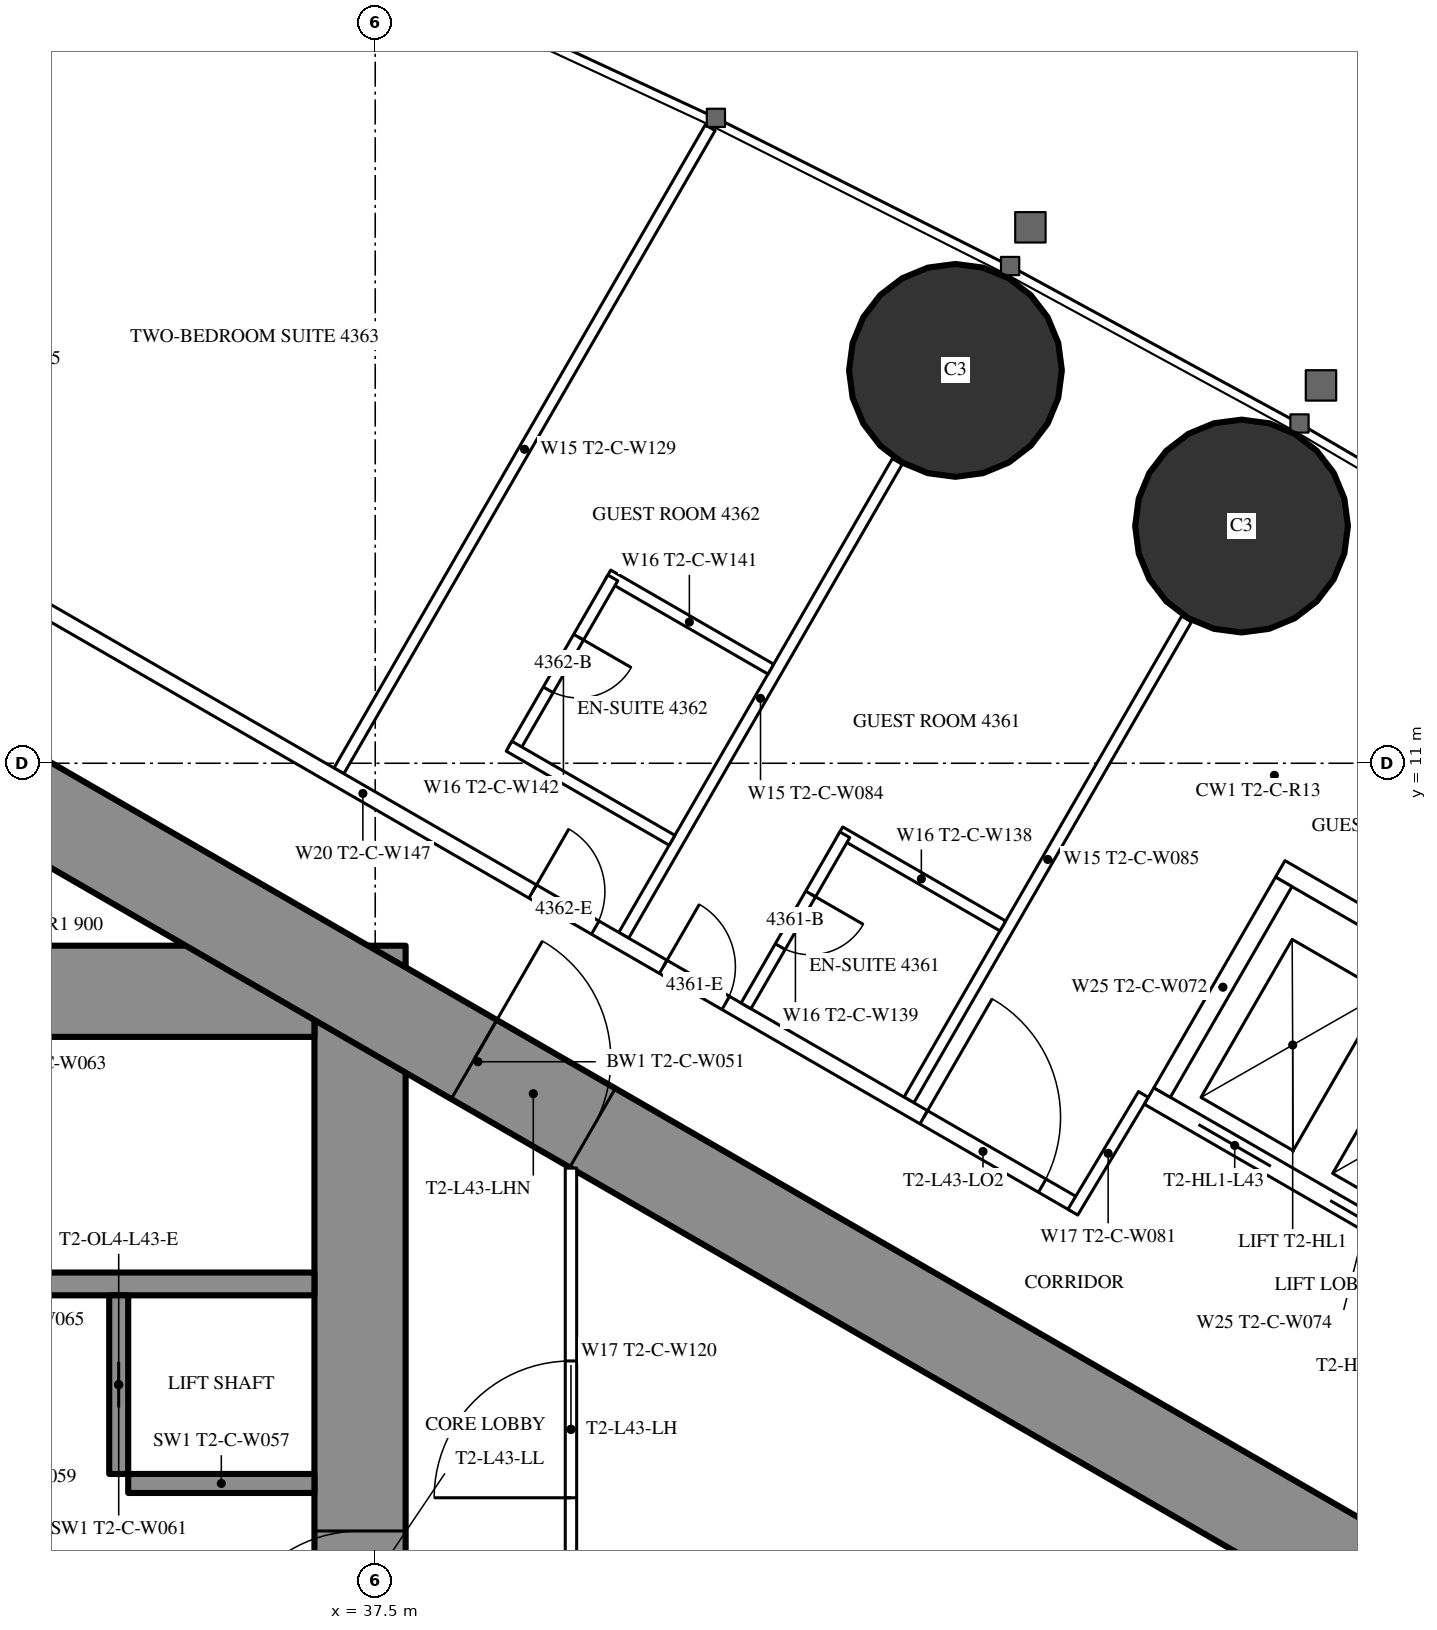
"""IFC4 building model, lengths in metres.
Left out: names, types, materials, properties, quantities, classifications, styles, units other than length and angle.
Written with IfcOpenShell. Run it as: python <this file> out.ifc"""

import sys

from ifc_helpers import new_model, si_unit, direction, frame, frame_2d, origin, origin_2d, place, context, subcontext, project, spatial, rectangle, circle, extrude, element, fill, save


model = new_model("IFC4")
c1 = context("Model", 3, precision=1e-05, world=origin(), true_north=direction((0.0, 1.0)))
c2 = subcontext(c1, "Body", "Model", "MODEL_VIEW")
j1 = project(units=[si_unit("LENGTHUNIT", "METRE"), si_unit("PLANEANGLEUNIT", "RADIAN")], contexts=[c1])
p1 = place(None, origin())
s1 = spatial("IfcSite", under=j1, at=p1, CompositionType="ELEMENT")
p2 = place(p1, origin())
s2 = spatial("IfcBuilding", under=s1, at=p2, CompositionType="ELEMENT")
p3 = place(p2, frame((0.0, 0.0, 163.3)))
s3 = spatial("IfcBuildingStorey", under=s2, at=p3, CompositionType="ELEMENT", Elevation=163.3)
for number, where, z_axis, x_axis in (
    (1, (48.897, 14.121, 0.0), (0.0, 0.0, 1.0), (1.0, 0.0, 0.0)),
    (2, (45.134, 16.168, 0.0), (0.0, 0.0, 1.0), (1.0, 0.0, 0.0)),
):
    element("IfcColumn", number, at=place(p3, frame(where, z_axis=z_axis, x_axis=x_axis)), inside=s3, PredefinedType="COLUMN", context=c2, shape_type="SweptSolid", body=[
        extrude(circle(Radius=1.4, at=origin_2d()), origin(), (0.0, 0.0, 1.0), 3.5),
    ])
p4 = place(p3, frame((37.3, -8.6, 0.0), z_axis=(0.0, 0.0, 1.0), x_axis=(0.0, 1.0, 0.0)))
e3 = element("IfcWall", 3, at=p4, inside=s3, PredefinedType="SHEAR", context=c2, shape_type="SweptSolid", body=[
    extrude(rectangle(XDim=17.2, YDim=1.2, at=frame_2d((8.6, 0.0))), origin(), (0.0, 0.0, 1.0), 3.5),
])
p5 = place(p4, frame((7.7, 0.0, 0.0)))
e4 = element("IfcOpeningElement", 4, at=p5, cuts=e3, PredefinedType="OPENING", context=c2, shape_type="SweptSolid", body=[
    extrude(rectangle(XDim=1.8, YDim=2.2, at=frame_2d((0.9, 1.1))), frame((0.0, 0.61, 0.0), z_axis=(0.0, -1.0, 0.0), x_axis=(1.0, 0.0, 0.0)), (0.0, 0.0, 1.0), 1.22),
])
p6 = place(p3, frame((28.3, 8.0, 0.0), z_axis=(0.0, 0.0, 1.0), x_axis=(1.0, 0.0, 0.0)))
e5 = element("IfcWall", 5, at=p6, inside=s3, PredefinedType="SHEAR", context=c2, shape_type="SweptSolid", body=[
    extrude(rectangle(XDim=8.4, YDim=1.2, at=frame_2d((4.2, 0.0))), origin(), (0.0, 0.0, 1.0), 3.5),
])
p7 = place(p6, frame((0.25, 0.0, 0.0)))
e6 = element("IfcOpeningElement", 6, at=p7, cuts=e5, PredefinedType="OPENING", context=c2, shape_type="SweptSolid", body=[
    extrude(rectangle(XDim=1.0, YDim=2.2, at=frame_2d((0.5, 1.1))), frame((0.0, 0.61, 0.0), z_axis=(0.0, -1.0, 0.0), x_axis=(1.0, 0.0, 0.0)), (0.0, 0.0, 1.0), 1.22),
])
p8 = place(p3, frame((28.3, 4.15, 0.0), z_axis=(0.0, 0.0, 1.0), x_axis=(1.0, 0.0, 0.0)))
e7 = element("IfcWall", 7, at=p8, inside=s3, PredefinedType="SHEAR", context=c2, shape_type="SweptSolid", body=[
    extrude(rectangle(XDim=8.4, YDim=0.3, at=frame_2d((4.2, 0.0))), origin(), (0.0, 0.0, 1.0), 3.5),
])
p9 = place(p3, frame((34.125, 1.65, 0.0), z_axis=(0.0, 0.0, 1.0), x_axis=(0.0, 1.0, 0.0)))
e8 = element("IfcWall", 8, at=p9, inside=s3, PredefinedType="SHEAR", context=c2, shape_type="SweptSolid", body=[
    extrude(rectangle(XDim=2.35, YDim=0.25, at=frame_2d((1.175, 0.0))), origin(), (0.0, 0.0, 1.0), 3.5),
])
p10 = place(p9, frame((0.875, 0.0, 0.0)))
e9 = element("IfcOpeningElement", 9, at=p10, cuts=e8, PredefinedType="OPENING", context=c2, shape_type="SweptSolid", body=[
    extrude(rectangle(XDim=0.6, YDim=2.0, at=frame_2d((0.3, 1.0))), frame((0.0, 0.135, 0.0), z_axis=(0.0, -1.0, 0.0), x_axis=(1.0, 0.0, 0.0)), (0.0, 0.0, 1.0), 0.27),
])
p11 = place(p3, frame((34.25, 1.525, 0.0), z_axis=(0.0, 0.0, 1.0), x_axis=(1.0, 0.0, 0.0)))
e10 = element("IfcWall", 10, at=p11, inside=s3, PredefinedType="SHEAR", context=c2, shape_type="SweptSolid", body=[
    extrude(rectangle(XDim=2.45, YDim=0.25, at=frame_2d((1.225, 0.0))), origin(), (0.0, 0.0, 1.0), 3.5),
])
p12 = place(p3, frame((27.2, -13.8, 0.0), z_axis=(0.0, 0.0, 1.0), x_axis=(0.866027159892, 0.499996958321, 0.0)))
e11 = element("IfcWall", 11, at=p12, inside=s3, PredefinedType="SHEAR", context=c2, shape_type="SweptSolid", body=[
    extrude(rectangle(XDim=27.947, YDim=1.2, at=frame_2d((13.973, 0.0))), origin(), (0.0, 0.0, 1.0), 3.5),
])
p13 = place(p12, frame((4.6, 0.0, 0.0)))
e12 = element("IfcOpeningElement", 12, at=p13, cuts=e11, PredefinedType="OPENING", context=c2, shape_type="SweptSolid", body=[
    extrude(rectangle(XDim=1.0, YDim=2.2, at=frame_2d((0.5, 1.1))), frame((0.0, 0.61, 0.0), z_axis=(0.0, -1.0, 0.0), x_axis=(1.0, 0.0, 0.0)), (0.0, 0.0, 1.0), 1.22),
])
p14 = place(p12, frame((13.395, 0.0, 0.0)))
e13 = element("IfcOpeningElement", 13, at=p14, cuts=e11, PredefinedType="OPENING", context=c2, shape_type="SweptSolid", body=[
    extrude(rectangle(XDim=1.8, YDim=2.2, at=frame_2d((0.9, 1.1))), frame((0.0, 0.61, 0.0), z_axis=(0.0, -1.0, 0.0), x_axis=(1.0, 0.0, 0.0)), (0.0, 0.0, 1.0), 1.22),
])
p15 = place(p3, frame((27.2, 13.8, 0.0), z_axis=(0.0, 0.0, 1.0), x_axis=(0.866024515034, -0.500001539357, 0.0)))
e14 = element("IfcWall", 14, at=p15, inside=s3, PredefinedType="SHEAR", context=c2, shape_type="SweptSolid", body=[
    extrude(rectangle(XDim=26.907, YDim=1.2, at=frame_2d((13.454, 0.0))), origin(), (0.0, 0.0, 1.0), 3.5),
])
p16 = place(p15, frame((4.6, 0.0, 0.0)))
e15 = element("IfcOpeningElement", 15, at=p16, cuts=e14, PredefinedType="OPENING", context=c2, shape_type="SweptSolid", body=[
    extrude(rectangle(XDim=1.0, YDim=2.2, at=frame_2d((0.5, 1.1))), frame((0.0, 0.61, 0.0), z_axis=(0.0, -1.0, 0.0), x_axis=(1.0, 0.0, 0.0)), (0.0, 0.0, 1.0), 1.22),
])
p17 = place(p15, frame((13.395, 0.0, 0.0)))
e16 = element("IfcOpeningElement", 16, at=p17, cuts=e14, PredefinedType="OPENING", context=c2, shape_type="SweptSolid", body=[
    extrude(rectangle(XDim=1.8, YDim=2.2, at=frame_2d((0.9, 1.1))), frame((0.0, 0.61, 0.0), z_axis=(0.0, -1.0, 0.0), x_axis=(1.0, 0.0, 0.0)), (0.0, 0.0, 1.0), 1.22),
])
p18 = place(p3, frame((37.022, 10.9, 0.0), z_axis=(0.0, 0.0, 1.0), x_axis=(0.499998620953, 0.866026199976, 0.0)))
e17 = element("IfcWall", 17, at=p18, inside=s3, PredefinedType="PARTITIONING", context=c2, shape_type="SweptSolid", body=[
    extrude(rectangle(XDim=9.77, YDim=0.15, at=frame_2d((4.885, 0.0))), origin(), (0.0, 0.0, 1.0), 3.25),
])
p19 = place(p3, frame((40.769, 8.737, 0.0), z_axis=(0.0, 0.0, 1.0), x_axis=(0.500013115284, 0.866017831539, 0.0)))
e18 = element("IfcWall", 18, at=p19, inside=s3, PredefinedType="PARTITIONING", context=c2, shape_type="SweptSolid", body=[
    extrude(rectangle(XDim=7.198, YDim=0.15, at=frame_2d((3.599, 0.0))), origin(), (0.0, 0.0, 1.0), 2.3),
])
p20 = place(p3, frame((44.521, 6.571, 0.0), z_axis=(0.0, 0.0, 1.0), x_axis=(0.500020376429, 0.866013639128, 0.0)))
e19 = element("IfcWall", 19, at=p20, inside=s3, PredefinedType="PARTITIONING", context=c2, shape_type="SweptSolid", body=[
    extrude(rectangle(XDim=7.306, YDim=0.15, at=frame_2d((3.653, 0.0))), origin(), (0.0, 0.0, 1.0), 2.3),
])
p21 = place(p3, frame((27.959, 16.017, 0.0), z_axis=(0.0, 0.0, 1.0), x_axis=(0.866027146794, -0.499996981007, 0.0)))
e20 = element("IfcWall", 20, at=p21, inside=s3, PredefinedType="PARTITIONING", context=c2, shape_type="SweptSolid", body=[
    extrude(rectangle(XDim=21.657, YDim=0.2, at=frame_2d((10.829, 0.0))), origin(), (0.0, 0.0, 1.0), 3.25),
])
p22 = place(p21, frame((15.391, 0.0, 0.0)))
e21 = element("IfcOpeningElement", 21, at=p22, cuts=e20, PredefinedType="OPENING", context=c2, shape_type="SweptSolid", body=[
    extrude(rectangle(XDim=0.95, YDim=2.2, at=frame_2d((0.475, 1.1))), frame((0.0, 0.11, 0.0), z_axis=(0.0, -1.0, 0.0), x_axis=(1.0, 0.0, 0.0)), (0.0, 0.0, 1.0), 0.22),
])
p23 = place(p21, frame((13.409, 0.0, 0.0)))
e22 = element("IfcOpeningElement", 22, at=p23, cuts=e20, PredefinedType="OPENING", context=c2, shape_type="SweptSolid", body=[
    extrude(rectangle(XDim=0.95, YDim=2.2, at=frame_2d((0.475, 1.1))), frame((0.0, 0.11, 0.0), z_axis=(0.0, -1.0, 0.0), x_axis=(1.0, 0.0, 0.0)), (0.0, 0.0, 1.0), 0.22),
])
p24 = place(p21, frame((0.6, 0.0, 0.0)))
e23 = element("IfcOpeningElement", 23, at=p24, cuts=e20, PredefinedType="OPENING", context=c2, shape_type="SweptSolid", body=[
    extrude(rectangle(XDim=0.95, YDim=2.2, at=frame_2d((0.475, 1.1))), frame((0.0, 0.11, 0.0), z_axis=(0.0, -1.0, 0.0), x_axis=(1.0, 0.0, 0.0)), (0.0, 0.0, 1.0), 0.22),
])
p25 = place(p21, frame((19.349, 0.0, 0.0)))
e24 = element("IfcOpeningElement", 24, at=p25, cuts=e20, PredefinedType="OPENING", context=c2, shape_type="SweptSolid", body=[
    extrude(rectangle(XDim=1.8, YDim=2.2, at=frame_2d((0.9, 1.1))), frame((0.0, 0.11, 0.0), z_axis=(0.0, -1.0, 0.0), x_axis=(1.0, 0.0, 0.0)), (0.0, 0.0, 1.0), 0.22),
])
p26 = place(p3, frame((47.606, 6.643, 0.0), z_axis=(0.0, 0.0, 1.0), x_axis=(-0.514237157483, -0.857648031458, 0.0)))
e25 = element("IfcWall", 25, at=p26, inside=s3, PredefinedType="PARTITIONING", context=c2, shape_type="SweptSolid", body=[
    extrude(rectangle(XDim=1.805, YDim=0.15, at=frame_2d((0.902, 0.0))), origin(), (0.0, 0.0, 1.0), 3.25),
])
p27 = place(p3, frame((43.613, 10.097, 0.0), z_axis=(0.0, 0.0, 1.0), x_axis=(0.866031185235, -0.4999899861, 0.0)))
e26 = element("IfcWall", 26, at=p27, inside=s3, PredefinedType="PARTITIONING", context=c2, shape_type="SweptSolid", body=[
    extrude(rectangle(XDim=2.475, YDim=0.15, at=frame_2d((1.238, 0.0))), origin(), (0.0, 0.0, 1.0), 3.25),
])
p28 = place(p3, frame((42.378, 7.808, 0.0), z_axis=(0.0, 0.0, 1.0), x_axis=(0.500006934395, 0.866021400173, 0.0)))
e27 = element("IfcWall", 27, at=p28, inside=s3, PredefinedType="PARTITIONING", context=c2, shape_type="SweptSolid", body=[
    extrude(rectangle(XDim=2.6, YDim=0.15, at=frame_2d((1.3, 0.0))), origin(), (0.0, 0.0, 1.0), 3.25),
])
p29 = place(p28, frame((0.9, 0.0, 0.0)))
e28 = element("IfcOpeningElement", 28, at=p29, cuts=e27, PredefinedType="OPENING", context=c2, shape_type="SweptSolid", body=[
    extrude(rectangle(XDim=0.8, YDim=2.2, at=frame_2d((0.4, 1.1))), frame((0.0, 0.085, 0.0), z_axis=(0.0, -1.0, 0.0), x_axis=(1.0, 0.0, 0.0)), (0.0, 0.0, 1.0), 0.17),
])
p30 = place(p3, frame((40.561, 13.476, 0.0), z_axis=(0.0, 0.0, 1.0), x_axis=(0.866006523861, -0.500032699561, 0.0)))
e29 = element("IfcWall", 29, at=p30, inside=s3, PredefinedType="PARTITIONING", context=c2, shape_type="SweptSolid", body=[
    extrude(rectangle(XDim=2.475, YDim=0.15, at=frame_2d((1.237, 0.0))), origin(), (0.0, 0.0, 1.0), 3.25),
])
p31 = place(p3, frame((39.326, 11.187, 0.0), z_axis=(0.0, 0.0, 1.0), x_axis=(0.500047596559, 0.865997922154, 0.0)))
e30 = element("IfcWall", 30, at=p31, inside=s3, PredefinedType="PARTITIONING", context=c2, shape_type="SweptSolid", body=[
    extrude(rectangle(XDim=2.6, YDim=0.15, at=frame_2d((1.3, 0.0))), origin(), (0.0, 0.0, 1.0), 3.25),
])
p32 = place(p31, frame((0.9, 0.0, 0.0)))
e31 = element("IfcOpeningElement", 31, at=p32, cuts=e30, PredefinedType="OPENING", context=c2, shape_type="SweptSolid", body=[
    extrude(rectangle(XDim=0.8, YDim=2.2, at=frame_2d((0.4, 1.1))), frame((0.0, 0.085, 0.0), z_axis=(0.0, -1.0, 0.0), x_axis=(1.0, 0.0, 0.0)), (0.0, 0.0, 1.0), 0.17),
])
p33 = place(p3, frame((39.261, 11.224, 0.0), z_axis=(0.0, 0.0, 1.0), x_axis=(0.866006523861, -0.500032699561, 0.0)))
e32 = element("IfcWall", 32, at=p33, inside=s3, PredefinedType="PARTITIONING", context=c2, shape_type="SweptSolid", body=[
    extrude(rectangle(XDim=2.475, YDim=0.15, at=frame_2d((1.237, 0.0))), origin(), (0.0, 0.0, 1.0), 3.25),
])
p34 = place(p3, frame((40.075, -1.2, 0.0), z_axis=(0.0, 0.0, 1.0), x_axis=(0.0, 1.0, 0.0)))
e33 = element("IfcWall", 33, at=p34, inside=s3, PredefinedType="PARTITIONING", context=c2, shape_type="SweptSolid", body=[
    extrude(rectangle(XDim=6.874, YDim=0.15, at=frame_2d((3.437, 0.0))), origin(), (0.0, 0.0, 1.0), 3.25),
])
p35 = place(p34, frame((2.537, 0.0, 0.0)))
e34 = element("IfcOpeningElement", 34, at=p35, cuts=e33, PredefinedType="OPENING", context=c2, shape_type="SweptSolid", body=[
    extrude(rectangle(XDim=1.8, YDim=2.2, at=frame_2d((0.9, 1.1))), frame((0.0, 0.085, 0.0), z_axis=(0.0, -1.0, 0.0), x_axis=(1.0, 0.0, 0.0)), (0.0, 0.0, 1.0), 0.17),
])
p36 = place(p3, frame((47.681, 6.622, 0.0), z_axis=(0.0, 0.0, 1.0), x_axis=(0.86603344179, -0.499986077507, 0.0)))
e35 = element("IfcWall", 35, at=p36, inside=s3, PredefinedType="PARTITIONING", context=c2, shape_type="SweptSolid", body=[
    extrude(rectangle(XDim=6.6, YDim=0.25, at=frame_2d((3.3, 0.0))), origin(), (0.0, 0.0, 1.0), 3.25),
])
p37 = place(p36, frame((0.75, 0.0, 0.0)))
e36 = element("IfcOpeningElement", 36, at=p37, cuts=e35, PredefinedType="OPENING", context=c2, shape_type="SweptSolid", body=[
    extrude(rectangle(XDim=1.1, YDim=2.2, at=frame_2d((0.55, 1.1))), frame((0.0, 0.135, 0.0), z_axis=(0.0, -1.0, 0.0), x_axis=(1.0, 0.0, 0.0)), (0.0, 0.0, 1.0), 0.27),
])
p38 = place(p36, frame((2.75, 0.0, 0.0)))
e37 = element("IfcOpeningElement", 37, at=p38, cuts=e35, PredefinedType="OPENING", context=c2, shape_type="SweptSolid", body=[
    extrude(rectangle(XDim=1.1, YDim=2.2, at=frame_2d((0.55, 1.1))), frame((0.0, 0.135, 0.0), z_axis=(0.0, -1.0, 0.0), x_axis=(1.0, 0.0, 0.0)), (0.0, 0.0, 1.0), 0.27),
])
p39 = place(p36, frame((4.75, 0.0, 0.0)))
e38 = element("IfcOpeningElement", 38, at=p39, cuts=e35, PredefinedType="OPENING", context=c2, shape_type="SweptSolid", body=[
    extrude(rectangle(XDim=1.1, YDim=2.2, at=frame_2d((0.55, 1.1))), frame((0.0, 0.135, 0.0), z_axis=(0.0, -1.0, 0.0), x_axis=(1.0, 0.0, 0.0)), (0.0, 0.0, 1.0), 0.27),
])
p40 = place(p3, frame((49.406, 9.611, 0.0), z_axis=(0.0, 0.0, 1.0), x_axis=(0.86603344179, -0.499986077507, 0.0)))
e39 = element("IfcWall", 39, at=p40, inside=s3, PredefinedType="PARTITIONING", context=c2, shape_type="SweptSolid", body=[
    extrude(rectangle(XDim=6.6, YDim=0.25, at=frame_2d((3.3, 0.0))), origin(), (0.0, 0.0, 1.0), 3.25),
])
p41 = place(p3, frame((47.852, 6.668, 0.0), z_axis=(0.0, 0.0, 1.0), x_axis=(0.499929347863, 0.866066190972, 0.0)))
e40 = element("IfcWall", 40, at=p41, inside=s3, PredefinedType="PARTITIONING", context=c2, shape_type="SweptSolid", body=[
    extrude(rectangle(XDim=3.201, YDim=0.25, at=frame_2d((1.6, 0.0))), origin(), (0.0, 0.0, 1.0), 3.25),
])
p42 = place(p29, origin())
e41 = element("IfcDoor", 41, at=p42, inside=s3, OperationType="SINGLE_SWING_RIGHT", PredefinedType="DOOR", context=c2, shape_type="SweptSolid", body=[
    extrude(rectangle(XDim=0.8, YDim=2.2, at=frame_2d((0.4, 1.1))), frame((0.0, 0.025, 0.0), z_axis=(0.0, -1.0, 0.0), x_axis=(1.0, 0.0, 0.0)), (0.0, 0.0, 1.0), 0.05),
])
fill(e28, e41)
p43 = place(p22, origin())
e42 = element("IfcDoor", 42, at=p43, inside=s3, OperationType="SINGLE_SWING_LEFT", PredefinedType="DOOR", context=c2, shape_type="SweptSolid", body=[
    extrude(rectangle(XDim=0.95, YDim=2.2, at=frame_2d((0.475, 1.1))), frame((0.0, 0.025, 0.0), z_axis=(0.0, -1.0, 0.0), x_axis=(1.0, 0.0, 0.0)), (0.0, 0.0, 1.0), 0.05),
])
fill(e21, e42)
p44 = place(p32, origin())
e43 = element("IfcDoor", 43, at=p44, inside=s3, OperationType="SINGLE_SWING_RIGHT", PredefinedType="DOOR", context=c2, shape_type="SweptSolid", body=[
    extrude(rectangle(XDim=0.8, YDim=2.2, at=frame_2d((0.4, 1.1))), frame((0.0, 0.025, 0.0), z_axis=(0.0, -1.0, 0.0), x_axis=(1.0, 0.0, 0.0)), (0.0, 0.0, 1.0), 0.05),
])
fill(e31, e43)
p45 = place(p23, origin())
e44 = element("IfcDoor", 44, at=p45, inside=s3, OperationType="SINGLE_SWING_LEFT", PredefinedType="DOOR", context=c2, shape_type="SweptSolid", body=[
    extrude(rectangle(XDim=0.95, YDim=2.2, at=frame_2d((0.475, 1.1))), frame((0.0, 0.025, 0.0), z_axis=(0.0, -1.0, 0.0), x_axis=(1.0, 0.0, 0.0)), (0.0, 0.0, 1.0), 0.05),
])
fill(e22, e44)
p46 = place(p25, origin())
e45 = element("IfcDoor", 45, at=p46, inside=s3, OperationType="DOUBLE_DOOR_SINGLE_SWING", PredefinedType="DOOR", context=c2, shape_type="SweptSolid", body=[
    extrude(rectangle(XDim=1.8, YDim=2.2, at=frame_2d((0.9, 1.1))), frame((0.0, 0.025, 0.0), z_axis=(0.0, -1.0, 0.0), x_axis=(1.0, 0.0, 0.0)), (0.0, 0.0, 1.0), 0.05),
])
fill(e24, e45)
p47 = place(p35, origin())
e46 = element("IfcDoor", 46, at=p47, inside=s3, OperationType="DOUBLE_DOOR_SINGLE_SWING", PredefinedType="DOOR", context=c2, shape_type="SweptSolid", body=[
    extrude(rectangle(XDim=1.8, YDim=2.2, at=frame_2d((0.9, 1.1))), frame((0.0, 0.025, 0.0), z_axis=(0.0, -1.0, 0.0), x_axis=(1.0, 0.0, 0.0)), (0.0, 0.0, 1.0), 0.05),
])
fill(e34, e46)
p48 = place(p17, origin())
e47 = element("IfcDoor", 47, at=p48, inside=s3, OperationType="DOUBLE_DOOR_SINGLE_SWING", PredefinedType="DOOR", context=c2, shape_type="SweptSolid", body=[
    extrude(rectangle(XDim=1.8, YDim=2.2, at=frame_2d((0.9, 1.1))), frame((0.0, 0.025, 0.0), z_axis=(0.0, -1.0, 0.0), x_axis=(1.0, 0.0, 0.0)), (0.0, 0.0, 1.0), 0.05),
])
fill(e16, e47)
p49 = place(p5, origin())
e48 = element("IfcDoor", 48, at=p49, inside=s3, OperationType="DOUBLE_DOOR_SINGLE_SWING", PredefinedType="DOOR", context=c2, shape_type="SweptSolid", body=[
    extrude(rectangle(XDim=1.8, YDim=2.2, at=frame_2d((0.9, 1.1))), frame((0.0, 0.025, 0.0), z_axis=(0.0, -1.0, 0.0), x_axis=(1.0, 0.0, 0.0)), (0.0, 0.0, 1.0), 0.05),
])
fill(e4, e48)
p50 = place(p10, origin())
e49 = element("IfcDoor", 49, at=p50, inside=s3, OperationType="SLIDING_TO_LEFT", PredefinedType="DOOR", context=c2, shape_type="SweptSolid", body=[
    extrude(rectangle(XDim=0.6, YDim=2.0, at=frame_2d((0.3, 1.0))), frame((0.0, 0.025, 0.0), z_axis=(0.0, -1.0, 0.0), x_axis=(1.0, 0.0, 0.0)), (0.0, 0.0, 1.0), 0.05),
])
fill(e9, e49)
p51 = place(p37, origin())
e50 = element("IfcDoor", 50, at=p51, inside=s3, OperationType="DOUBLE_DOOR_SLIDING", PredefinedType="USERDEFINED", context=c2, shape_type="SweptSolid", body=[
    extrude(rectangle(XDim=1.1, YDim=2.2, at=frame_2d((0.55, 1.1))), frame((0.0, 0.025, 0.0), z_axis=(0.0, -1.0, 0.0), x_axis=(1.0, 0.0, 0.0)), (0.0, 0.0, 1.0), 0.05),
])
fill(e36, e50)
p52 = place(p38, origin())
e51 = element("IfcDoor", 51, at=p52, inside=s3, OperationType="DOUBLE_DOOR_SLIDING", PredefinedType="USERDEFINED", context=c2, shape_type="SweptSolid", body=[
    extrude(rectangle(XDim=1.1, YDim=2.2, at=frame_2d((0.55, 1.1))), frame((0.0, 0.025, 0.0), z_axis=(0.0, -1.0, 0.0), x_axis=(1.0, 0.0, 0.0)), (0.0, 0.0, 1.0), 0.05),
])
fill(e37, e51)
save(model, sys.argv[1])
